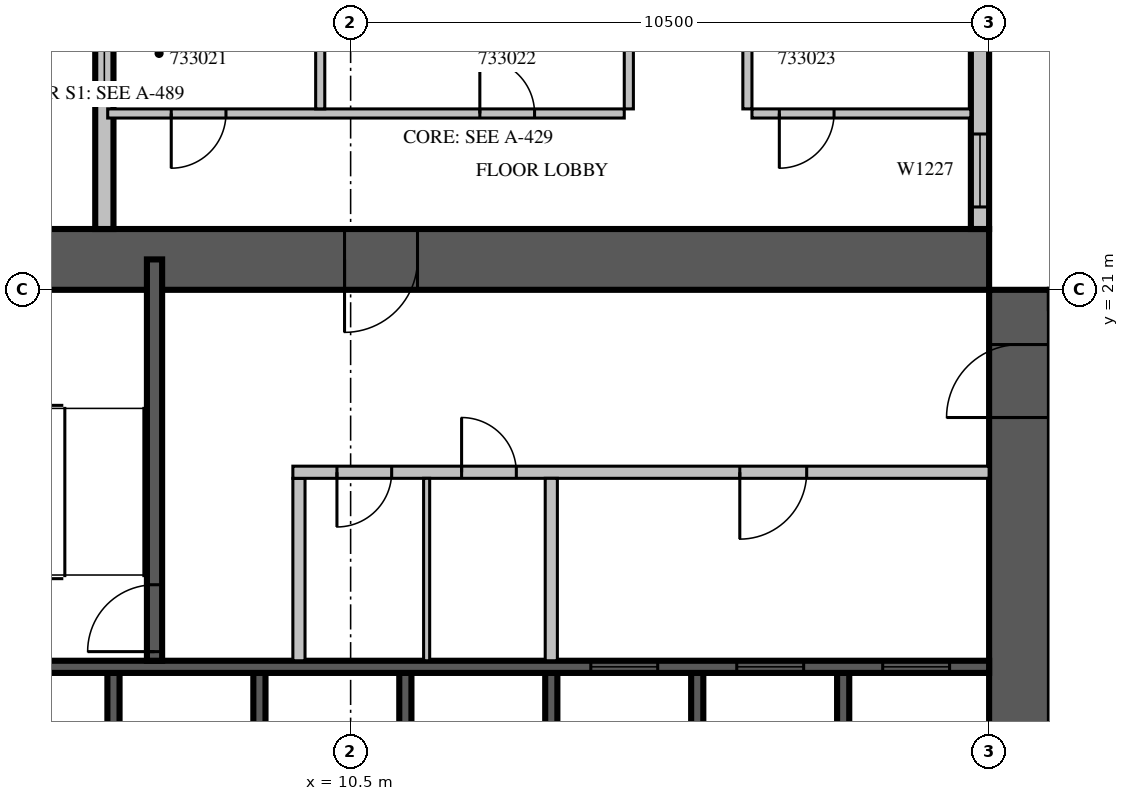
"""IFC4 building model, lengths in metres.
Left out: names, types, materials, properties, quantities, classifications, styles, units other than length and angle.
Written with IfcOpenShell. Run it as: python <this file> out.ifc"""

import sys

from ifc_helpers import new_model, si_unit, direction, frame, frame_2d, origin, place, context, subcontext, project, spatial, rectangle, extrude, source, transform, mapped, element, fill, save


model = new_model("IFC4")
c1 = context("Model", 3, precision=1e-05, world=origin(), true_north=direction((0.0, 1.0)))
c2 = subcontext(c1, "Body", "Model", "MODEL_VIEW")
j1 = project(units=[si_unit("LENGTHUNIT", "METRE"), si_unit("PLANEANGLEUNIT", "RADIAN")], contexts=[c1])
p1 = place(None, origin())
s1 = spatial("IfcSite", under=j1, at=p1, CompositionType="ELEMENT")
p2 = place(p1, origin())
s2 = spatial("IfcBuilding", under=s1, at=p2, CompositionType="ELEMENT")
p3 = place(p2, frame((0.0, 0.0, 149.7)))
s3 = spatial("IfcBuildingStorey", under=s2, at=p3, CompositionType="ELEMENT", Elevation=149.7)
m1 = source(origin(), c2, "Body", "SweptSolid", [
    extrude(rectangle(XDim=16.8, YDim=1.0, at=frame_2d((8.4, 0.0))), origin(), (0.0, 0.0, 1.0), 4.2),
])
p4 = place(p3, frame((21.5, 4.2, 0.0), z_axis=(0.0, 0.0, 1.0), x_axis=(0.0, 1.0, 0.0)))
e1 = element("IfcWall", 1, at=p4, inside=s3, PredefinedType="SHEAR", context=c2, shape_type="MappedRepresentation", body=[
    mapped(m1, transform((0.0, 0.0, 0.0), scale=1.0)),
])
m2 = source(origin(), c2, "Body", "SweptSolid", [
    extrude(rectangle(XDim=1.2, YDim=2.1, at=frame_2d((0.6, 1.05))), frame((0.0, 0.51, 0.0), z_axis=(0.0, -1.0, 0.0), x_axis=(1.0, 0.0, 0.0)), (0.0, 0.0, 1.0), 1.02),
])
p5 = place(p4, frame((14.7, 0.0, 0.0)))
e2 = element("IfcOpeningElement", 2, at=p5, cuts=e1, PredefinedType="OPENING", context=c2, shape_type="MappedRepresentation", body=[
    mapped(m2, transform((0.0, 0.0, 0.0), scale=1.0)),
])
p6 = place(p3, frame((4.2, 21.5, 0.0), z_axis=(0.0, 0.0, 1.0), x_axis=(1.0, 0.0, 0.0)))
e3 = element("IfcWall", 3, at=p6, inside=s3, PredefinedType="SHEAR", context=c2, shape_type="MappedRepresentation", body=[
    mapped(m1, transform((0.0, 0.0, 0.0), scale=1.0)),
])
p7 = place(p6, frame((6.2, 0.0, 0.0)))
e4 = element("IfcOpeningElement", 4, at=p7, cuts=e3, PredefinedType="OPENING", context=c2, shape_type="MappedRepresentation", body=[
    mapped(m2, transform((0.0, 0.0, 0.0), scale=1.0)),
])
m3 = source(origin(), c2, "Body", "SweptSolid", [
    extrude(rectangle(XDim=6.875, YDim=0.3, at=frame_2d((3.438, 0.0))), origin(), (0.0, 0.0, 1.0), 3.8),
])
p8 = place(p3, frame((20.85, 22.0, 0.0), z_axis=(0.0, 0.0, 1.0), x_axis=(0.0, 1.0, 0.0)))
e5 = element("IfcWall", 5, at=p8, inside=s3, PredefinedType="STANDARD", context=c2, shape_type="MappedRepresentation", body=[
    mapped(m3, transform((0.0, 0.0, 0.0), scale=1.0)),
])
m4 = source(origin(), c2, "Body", "SweptSolid", [
    extrude(rectangle(XDim=1.2, YDim=2.7, at=frame_2d((0.6, 1.35))), frame((0.0, 0.16, 0.0), z_axis=(0.0, -1.0, 0.0), x_axis=(1.0, 0.0, 0.0)), (0.0, 0.0, 1.0), 0.32),
])
p9 = place(p8, frame((0.362, 0.0, 0.6)))
e6 = element("IfcOpeningElement", 6, at=p9, cuts=e5, PredefinedType="OPENING", context=c2, shape_type="MappedRepresentation", body=[
    mapped(m4, transform((0.0, 0.0, 0.0), scale=1.0)),
])
m5 = source(origin(), c2, "Body", "SweptSolid", [
    extrude(rectangle(XDim=1.0, YDim=2.1, at=frame_2d((0.5, 1.05))), frame((0.0, 0.16, 0.0), z_axis=(0.0, -1.0, 0.0), x_axis=(1.0, 0.0, 0.0)), (0.0, 0.0, 1.0), 0.32),
])
p10 = place(p8, frame((4.8, 0.0, 0.0)))
e7 = element("IfcOpeningElement", 7, at=p10, cuts=e5, PredefinedType="OPENING", context=c2, shape_type="MappedRepresentation", body=[
    mapped(m5, transform((0.0, 0.0, 0.0), scale=1.0)),
])
m6 = source(origin(), c2, "Body", "SweptSolid", [
    extrude(rectangle(XDim=16.4, YDim=0.3, at=frame_2d((8.2, 0.0))), origin(), (0.0, 0.0, 1.0), 3.8),
])
p11 = place(p3, frame((6.45, 38.4, 0.0), z_axis=(0.0, 0.0, 1.0), x_axis=(0.0, -1.0, 0.0)))
e8 = element("IfcWall", 8, at=p11, inside=s3, PredefinedType="STANDARD", context=c2, shape_type="MappedRepresentation", body=[
    mapped(m6, transform((0.0, 0.0, 0.0), scale=1.0)),
])
m7 = source(origin(), c2, "Body", "SweptSolid", [
    extrude(rectangle(XDim=1.8, YDim=2.7, at=frame_2d((0.9, 1.35))), frame((0.0, 0.16, 0.0), z_axis=(0.0, -1.0, 0.0), x_axis=(1.0, 0.0, 0.0)), (0.0, 0.0, 1.0), 0.32),
])
p12 = place(p11, frame((1.15, 0.0, 0.6)))
e9 = element("IfcOpeningElement", 9, at=p12, cuts=e8, PredefinedType="OPENING", context=c2, shape_type="MappedRepresentation", body=[
    mapped(m7, transform((0.0, 0.0, 0.0), scale=1.0)),
])
m8 = source(origin(), c2, "Body", "SweptSolid", [
    extrude(rectangle(XDim=2.4, YDim=2.7, at=frame_2d((1.2, 1.35))), frame((0.0, 0.16, 0.0), z_axis=(0.0, -1.0, 0.0), x_axis=(1.0, 0.0, 0.0)), (0.0, 0.0, 1.0), 0.32),
])
p13 = place(p11, frame((4.75, 0.0, 0.6)))
e10 = element("IfcOpeningElement", 10, at=p13, cuts=e8, PredefinedType="OPENING", context=c2, shape_type="MappedRepresentation", body=[
    mapped(m8, transform((0.0, 0.0, 0.0), scale=1.0)),
])
p14 = place(p11, frame((12.912, 0.0, 0.6)))
e11 = element("IfcOpeningElement", 11, at=p14, cuts=e8, PredefinedType="OPENING", context=c2, shape_type="MappedRepresentation", body=[
    mapped(m4, transform((0.0, 0.0, 0.0), scale=1.0)),
])
p15 = place(p11, frame((10.142, 0.0, 0.0)))
e12 = element("IfcOpeningElement", 12, at=p15, cuts=e8, PredefinedType="OPENING", context=c2, shape_type="MappedRepresentation", body=[
    mapped(m5, transform((0.0, 0.0, 0.0), scale=1.0)),
])
m9 = source(origin(), c2, "Body", "SweptSolid", [
    extrude(rectangle(XDim=3.0, YDim=0.2, at=frame_2d((1.5, 0.0))), origin(), (0.0, 0.0, 1.0), 4.2),
])
for number, where, z_axis, x_axis in (
    (13, (6.6, 11.7, 0.0), (0.0, 0.0, 1.0), (0.0, 1.0, 0.0)),
    (14, (9.0, 11.7, 0.0), (0.0, 0.0, 1.0), (0.0, 1.0, 0.0)),
    (15, (11.4, 11.7, 0.0), (0.0, 0.0, 1.0), (0.0, 1.0, 0.0)),
    (16, (13.8, 11.7, 0.0), (0.0, 0.0, 1.0), (0.0, 1.0, 0.0)),
    (17, (16.2, 11.7, 0.0), (0.0, 0.0, 1.0), (0.0, 1.0, 0.0)),
    (18, (18.6, 11.7, 0.0), (0.0, 0.0, 1.0), (0.0, 1.0, 0.0)),
):
    element("IfcWall", number, at=place(p3, frame(where, z_axis=z_axis, x_axis=x_axis)), inside=s3, PredefinedType="SOLIDWALL", context=c2, shape_type="MappedRepresentation", body=[
        mapped(m9, transform((0.0, 0.0, 0.0), scale=1.0)),
    ])
m10 = source(origin(), c2, "Body", "SweptSolid", [
    extrude(rectangle(XDim=16.8, YDim=0.2, at=frame_2d((8.4, 0.0))), origin(), (0.0, 0.0, 1.0), 4.2),
])
p16 = place(p3, frame((4.2, 14.8, 0.0), z_axis=(0.0, 0.0, 1.0), x_axis=(1.0, 0.0, 0.0)))
e19 = element("IfcWall", 19, at=p16, inside=s3, PredefinedType="SOLIDWALL", context=c2, shape_type="MappedRepresentation", body=[
    mapped(m10, transform((0.0, 0.0, 0.0), scale=1.0)),
])
m11 = source(origin(), c2, "Body", "SweptSolid", [
    extrude(rectangle(XDim=1.1, YDim=2.1, at=frame_2d((0.55, 1.05))), frame((0.0, 0.11, 0.0), z_axis=(0.0, -1.0, 0.0), x_axis=(1.0, 0.0, 0.0)), (0.0, 0.0, 1.0), 0.22),
])
p17 = place(p16, frame((10.25, 0.0, 0.0)))
e20 = element("IfcOpeningElement", 20, at=p17, cuts=e19, PredefinedType="OPENING", context=c2, shape_type="MappedRepresentation", body=[
    mapped(m11, transform((0.0, 0.0, 0.0), scale=1.0)),
])
p18 = place(p16, frame((12.65, 0.0, 0.0)))
e21 = element("IfcOpeningElement", 21, at=p18, cuts=e19, PredefinedType="OPENING", context=c2, shape_type="MappedRepresentation", body=[
    mapped(m11, transform((0.0, 0.0, 0.0), scale=1.0)),
])
p19 = place(p16, frame((15.05, 0.0, 0.0)))
e22 = element("IfcOpeningElement", 22, at=p19, cuts=e19, PredefinedType="OPENING", context=c2, shape_type="MappedRepresentation", body=[
    mapped(m11, transform((0.0, 0.0, 0.0), scale=1.0)),
])
m12 = source(origin(), c2, "Body", "SweptSolid", [
    extrude(rectangle(XDim=6.6, YDim=0.25, at=frame_2d((3.3, 0.0))), origin(), (0.0, 0.0, 1.0), 3.8),
])
p20 = place(p3, frame((7.275, 14.9, 0.0), z_axis=(0.0, 0.0, 1.0), x_axis=(0.0, 1.0, 0.0)))
e23 = element("IfcWall", 23, at=p20, inside=s3, PredefinedType="SOLIDWALL", context=c2, shape_type="MappedRepresentation", body=[
    mapped(m12, transform((0.0, 0.0, 0.0), scale=1.0)),
])
m13 = source(origin(), c2, "Body", "SweptSolid", [
    extrude(rectangle(XDim=1.1, YDim=2.1, at=frame_2d((0.55, 1.05))), frame((0.0, 0.135, 0.0), z_axis=(0.0, -1.0, 0.0), x_axis=(1.0, 0.0, 0.0)), (0.0, 0.0, 1.0), 0.27),
])
p21 = place(p20, frame((0.15, 0.0, 0.0)))
e24 = element("IfcOpeningElement", 24, at=p21, cuts=e23, PredefinedType="OPENING", context=c2, shape_type="MappedRepresentation", body=[
    mapped(m13, transform((0.0, 0.0, 0.0), scale=1.0)),
])
m14 = source(origin(), c2, "Body", "SweptSolid", [
    extrude(rectangle(XDim=3.0, YDim=0.2, at=frame_2d((1.5, 0.0))), origin(), (0.0, 0.0, 1.0), 3.8),
])
p22 = place(p3, frame((9.65, 14.9, 0.0), z_axis=(0.0, 0.0, 1.0), x_axis=(0.0, 1.0, 0.0)))
e25 = element("IfcWall", 25, at=p22, inside=s3, PredefinedType="PARTITIONING", context=c2, shape_type="MappedRepresentation", body=[
    mapped(m14, transform((0.0, 0.0, 0.0), scale=1.0)),
])
m15 = source(origin(), c2, "Body", "SweptSolid", [
    extrude(rectangle(XDim=11.45, YDim=0.2, at=frame_2d((5.725, 0.0))), origin(), (0.0, 0.0, 1.0), 3.8),
])
p23 = place(p3, frame((9.55, 18.0, 0.0), z_axis=(0.0, 0.0, 1.0), x_axis=(1.0, 0.0, 0.0)))
e26 = element("IfcWall", 26, at=p23, inside=s3, PredefinedType="PARTITIONING", context=c2, shape_type="MappedRepresentation", body=[
    mapped(m15, transform((0.0, 0.0, 0.0), scale=1.0)),
])
m16 = source(origin(), c2, "Body", "SweptSolid", [
    extrude(rectangle(XDim=0.9, YDim=2.1, at=frame_2d((0.45, 1.05))), frame((0.0, 0.11, 0.0), z_axis=(0.0, -1.0, 0.0), x_axis=(1.0, 0.0, 0.0)), (0.0, 0.0, 1.0), 0.22),
])
p24 = place(p23, frame((0.725, 0.0, 0.0)))
e27 = element("IfcOpeningElement", 27, at=p24, cuts=e26, PredefinedType="OPENING", context=c2, shape_type="MappedRepresentation", body=[
    mapped(m16, transform((0.0, 0.0, 0.0), scale=1.0)),
])
p25 = place(p23, frame((2.775, 0.0, 0.0)))
e28 = element("IfcOpeningElement", 28, at=p25, cuts=e26, PredefinedType="OPENING", context=c2, shape_type="MappedRepresentation", body=[
    mapped(m16, transform((0.0, 0.0, 0.0), scale=1.0)),
])
p26 = place(p23, frame((7.35, 0.0, 0.0)))
e29 = element("IfcOpeningElement", 29, at=p26, cuts=e26, PredefinedType="OPENING", context=c2, shape_type="MappedRepresentation", body=[
    mapped(m11, transform((0.0, 0.0, 0.0), scale=1.0)),
])
p27 = place(p3, frame((13.8, 14.9, 0.0), z_axis=(0.0, 0.0, 1.0), x_axis=(0.0, 1.0, 0.0)))
e30 = element("IfcWall", 30, at=p27, inside=s3, PredefinedType="PARTITIONING", context=c2, shape_type="MappedRepresentation", body=[
    mapped(m14, transform((0.0, 0.0, 0.0), scale=1.0)),
])
m17 = source(origin(), c2, "Body", "SweptSolid", [
    extrude(rectangle(XDim=3.0, YDim=0.1, at=frame_2d((1.5, 0.0))), origin(), (0.0, 0.0, 1.0), 3.8),
])
p28 = place(p3, frame((11.75, 14.9, 0.0), z_axis=(0.0, 0.0, 1.0), x_axis=(0.0, 1.0, 0.0)))
e31 = element("IfcWall", 31, at=p28, inside=s3, PredefinedType="PARTITIONING", context=c2, shape_type="MappedRepresentation", body=[
    mapped(m17, transform((0.0, 0.0, 0.0), scale=1.0)),
])
m18 = source(origin(), c2, "Body", "SweptSolid", [
    extrude(rectangle(XDim=8.495, YDim=0.15, at=frame_2d((4.247, 0.0))), origin(), (0.0, 0.0, 1.0), 3.8),
])
p29 = place(p3, frame((6.505, 23.9, 0.0), z_axis=(0.0, 0.0, 1.0), x_axis=(1.0, 0.0, 0.0)))
e32 = element("IfcWall", 32, at=p29, inside=s3, PredefinedType="PARTITIONING", context=c2, shape_type="MappedRepresentation", body=[
    mapped(m18, transform((0.0, 0.0, 0.0), scale=1.0)),
])
m19 = source(origin(), c2, "Body", "SweptSolid", [
    extrude(rectangle(XDim=0.9, YDim=2.1, at=frame_2d((0.45, 1.05))), frame((0.0, 0.085, 0.0), z_axis=(0.0, -1.0, 0.0), x_axis=(1.0, 0.0, 0.0)), (0.0, 0.0, 1.0), 0.17),
])
p30 = place(p29, frame((1.045, 0.0, 0.0)))
e33 = element("IfcOpeningElement", 33, at=p30, cuts=e32, PredefinedType="OPENING", context=c2, shape_type="MappedRepresentation", body=[
    mapped(m19, transform((0.0, 0.0, 0.0), scale=1.0)),
])
p31 = place(p29, frame((6.12, 0.0, 0.0)))
e34 = element("IfcOpeningElement", 34, at=p31, cuts=e32, PredefinedType="OPENING", context=c2, shape_type="MappedRepresentation", body=[
    mapped(m19, transform((0.0, 0.0, 0.0), scale=1.0)),
])
m20 = source(origin(), c2, "Body", "SweptSolid", [
    extrude(rectangle(XDim=3.6, YDim=0.15, at=frame_2d((1.8, 0.0))), origin(), (0.0, 0.0, 1.0), 3.8),
])
p32 = place(p3, frame((17.1, 23.9, 0.0), z_axis=(0.0, 0.0, 1.0), x_axis=(1.0, 0.0, 0.0)))
e35 = element("IfcWall", 35, at=p32, inside=s3, PredefinedType="PARTITIONING", context=c2, shape_type="MappedRepresentation", body=[
    mapped(m20, transform((0.0, 0.0, 0.0), scale=1.0)),
])
p33 = place(p32, frame((0.45, 0.0, 0.0)))
e36 = element("IfcOpeningElement", 36, at=p33, cuts=e35, PredefinedType="OPENING", context=c2, shape_type="MappedRepresentation", body=[
    mapped(m19, transform((0.0, 0.0, 0.0), scale=1.0)),
])
p34 = place(p3, frame((10.0, 23.975, 0.0), z_axis=(0.0, 0.0, 1.0), x_axis=(0.0, 1.0, 0.0)))
e37 = element("IfcWall", 37, at=p34, inside=s3, PredefinedType="PARTITIONING", context=c2, shape_type="SweptSolid", body=[
    extrude(rectangle(XDim=4.901, YDim=0.15, at=frame_2d((2.45, 0.0))), origin(), (0.0, 0.0, 1.0), 3.8),
])
m21 = source(origin(), c2, "Body", "SweptSolid", [
    extrude(rectangle(XDim=5.35, YDim=0.15, at=frame_2d((2.675, 0.0))), origin(), (0.0, 0.0, 1.0), 3.8),
])
for number, where, z_axis, x_axis in (
    (38, (15.075, 23.975, 0.0), (0.0, 0.0, 1.0), (0.0, 1.0, 0.0)),
    (39, (17.025, 29.325, 0.0), (0.0, 0.0, 1.0), (0.0, -1.0, 0.0)),
):
    element("IfcWall", number, at=place(p3, frame(where, z_axis=z_axis, x_axis=x_axis)), inside=s3, PredefinedType="PARTITIONING", context=c2, shape_type="MappedRepresentation", body=[
        mapped(m21, transform((0.0, 0.0, 0.0), scale=1.0)),
    ])
m22 = source(origin(), c2, "Body", "SweptSolid", [
    extrude(rectangle(XDim=1.2, YDim=2.7, at=frame_2d((0.6, 1.35))), frame((0.0, 0.03, 0.0), z_axis=(0.0, -1.0, 0.0), x_axis=(1.0, 0.0, 0.0)), (0.0, 0.0, 1.0), 0.06),
])
p35 = place(p9, origin())
e40 = element("IfcWindow", 40, at=p35, inside=s3, PartitioningType="SINGLE_PANEL", PredefinedType="WINDOW", context=c2, shape_type="MappedRepresentation", body=[
    mapped(m22, transform((0.0, 0.0, 0.0), scale=1.0)),
])
fill(e6, e40)
p36 = place(p14, origin())
e41 = element("IfcWindow", 41, at=p36, inside=s3, PartitioningType="SINGLE_PANEL", PredefinedType="WINDOW", context=c2, shape_type="MappedRepresentation", body=[
    mapped(m22, transform((0.0, 0.0, 0.0), scale=1.0)),
])
fill(e11, e41)
m23 = source(origin(), c2, "Body", "SweptSolid", [
    extrude(rectangle(XDim=1.1, YDim=2.1, at=frame_2d((0.55, 1.05))), frame((0.0, 0.025, 0.0), z_axis=(0.0, -1.0, 0.0), x_axis=(1.0, 0.0, 0.0)), (0.0, 0.0, 1.0), 0.05),
])
p37 = place(p17, origin())
e42 = element("IfcDoor", 42, at=p37, inside=s3, OperationType="SLIDING_TO_LEFT", PredefinedType="DOOR", context=c2, shape_type="MappedRepresentation", body=[
    mapped(m23, transform((0.0, 0.0, 0.0), scale=1.0)),
])
fill(e20, e42)
p38 = place(p18, origin())
e43 = element("IfcDoor", 43, at=p38, inside=s3, OperationType="SLIDING_TO_LEFT", PredefinedType="DOOR", context=c2, shape_type="MappedRepresentation", body=[
    mapped(m23, transform((0.0, 0.0, 0.0), scale=1.0)),
])
fill(e21, e43)
p39 = place(p19, origin())
e44 = element("IfcDoor", 44, at=p39, inside=s3, OperationType="SLIDING_TO_LEFT", PredefinedType="DOOR", context=c2, shape_type="MappedRepresentation", body=[
    mapped(m23, transform((0.0, 0.0, 0.0), scale=1.0)),
])
fill(e22, e44)
p40 = place(p21, origin())
e45 = element("IfcDoor", 45, at=p40, inside=s3, OperationType="SINGLE_SWING_LEFT", PredefinedType="DOOR", context=c2, shape_type="MappedRepresentation", body=[
    mapped(m23, transform((0.0, 0.0, 0.0), scale=1.0)),
])
fill(e24, e45)
m24 = source(origin(), c2, "Body", "SweptSolid", [
    extrude(rectangle(XDim=0.9, YDim=2.1, at=frame_2d((0.45, 1.05))), frame((0.0, 0.025, 0.0), z_axis=(0.0, -1.0, 0.0), x_axis=(1.0, 0.0, 0.0)), (0.0, 0.0, 1.0), 0.05),
])
p41 = place(p24, origin())
e46 = element("IfcDoor", 46, at=p41, inside=s3, OperationType="SINGLE_SWING_RIGHT", PredefinedType="DOOR", context=c2, shape_type="MappedRepresentation", body=[
    mapped(m24, transform((0.0, 0.0, 0.0), scale=1.0)),
])
fill(e27, e46)
p42 = place(p25, origin())
e47 = element("IfcDoor", 47, at=p42, inside=s3, OperationType="SINGLE_SWING_LEFT", PredefinedType="DOOR", context=c2, shape_type="MappedRepresentation", body=[
    mapped(m24, transform((0.0, 0.0, 0.0), scale=1.0)),
])
fill(e28, e47)
p43 = place(p26, origin())
e48 = element("IfcDoor", 48, at=p43, inside=s3, OperationType="SINGLE_SWING_RIGHT", PredefinedType="DOOR", context=c2, shape_type="MappedRepresentation", body=[
    mapped(m23, transform((0.0, 0.0, 0.0), scale=1.0)),
])
fill(e29, e48)
m25 = source(origin(), c2, "Body", "SweptSolid", [
    extrude(rectangle(XDim=1.2, YDim=2.1, at=frame_2d((0.6, 1.05))), frame((0.0, 0.025, 0.0), z_axis=(0.0, -1.0, 0.0), x_axis=(1.0, 0.0, 0.0)), (0.0, 0.0, 1.0), 0.05),
])
p44 = place(p7, origin())
e49 = element("IfcDoor", 49, at=p44, inside=s3, OperationType="SINGLE_SWING_RIGHT", PredefinedType="DOOR", context=c2, shape_type="MappedRepresentation", body=[
    mapped(m25, transform((0.0, 0.0, 0.0), scale=1.0)),
])
fill(e4, e49)
p45 = place(p5, origin())
e50 = element("IfcDoor", 50, at=p45, inside=s3, OperationType="SINGLE_SWING_LEFT", PredefinedType="DOOR", context=c2, shape_type="MappedRepresentation", body=[
    mapped(m25, transform((0.0, 0.0, 0.0), scale=1.0)),
])
fill(e2, e50)
p46 = place(p30, origin())
e51 = element("IfcDoor", 51, at=p46, inside=s3, OperationType="SINGLE_SWING_RIGHT", PredefinedType="DOOR", context=c2, shape_type="MappedRepresentation", body=[
    mapped(m24, transform((0.0, 0.0, 0.0), scale=1.0)),
])
fill(e33, e51)
p47 = place(p31, origin())
e52 = element("IfcDoor", 52, at=p47, inside=s3, OperationType="SINGLE_SWING_LEFT", PredefinedType="DOOR", context=c2, shape_type="MappedRepresentation", body=[
    mapped(m24, transform((0.0, 0.0, 0.0), scale=1.0)),
])
fill(e34, e52)
p48 = place(p33, origin())
e53 = element("IfcDoor", 53, at=p48, inside=s3, OperationType="SINGLE_SWING_RIGHT", PredefinedType="DOOR", context=c2, shape_type="MappedRepresentation", body=[
    mapped(m24, transform((0.0, 0.0, 0.0), scale=1.0)),
])
fill(e36, e53)
save(model, sys.argv[1])
